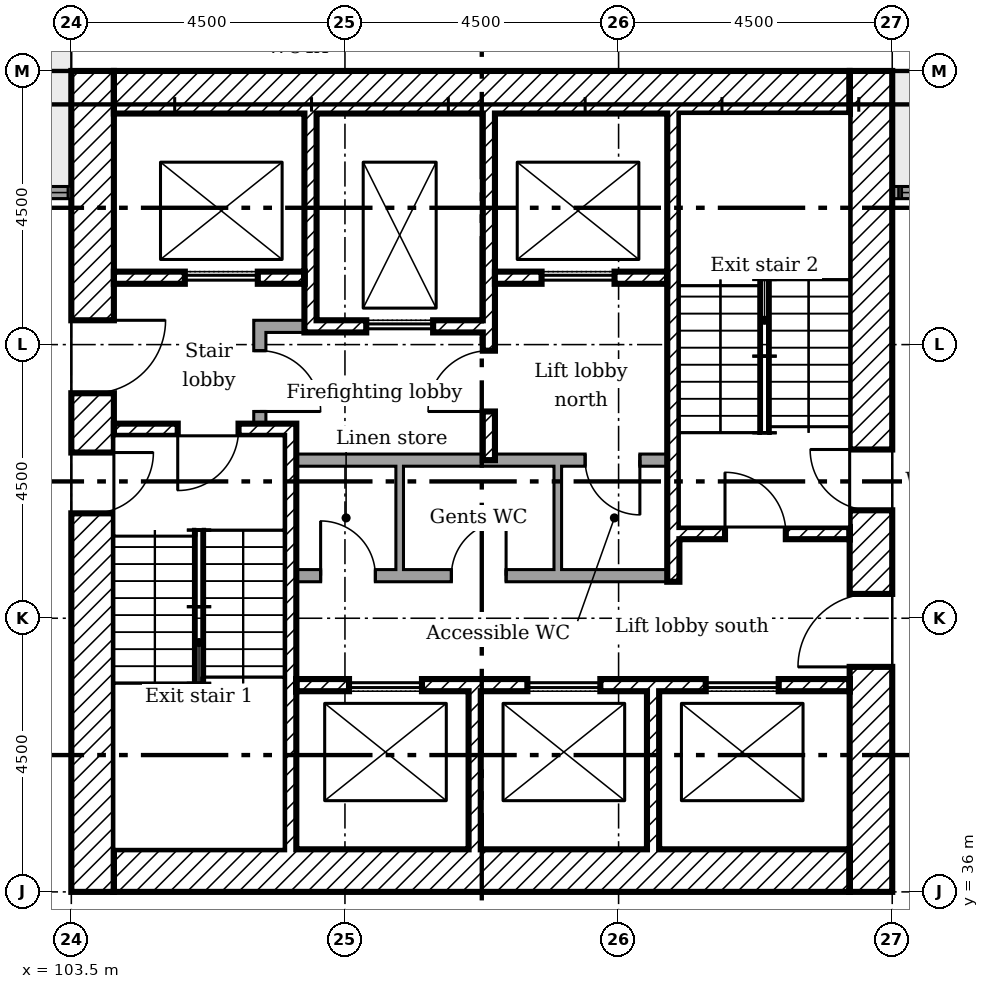
"""IFC4 building model, lengths in metres.
Left out: names, types, materials, properties, quantities, classifications, styles, units other than length and angle.
Written with IfcOpenShell. Run it as: python <this file> out.ifc"""

import sys

from ifc_helpers import new_model, si_unit, direction, frame, frame_2d, origin, place, context, subcontext, project, spatial, rectangle, extrude, element, fill, save


model = new_model("IFC4")
c1 = context("Model", 3, precision=1e-05, world=origin(), true_north=direction((0.0, 1.0)))
c2 = subcontext(c1, "Body", "Model", "MODEL_VIEW")
j1 = project(units=[si_unit("LENGTHUNIT", "METRE"), si_unit("PLANEANGLEUNIT", "RADIAN")], contexts=[c1])
p1 = place(None, origin())
s1 = spatial("IfcSite", under=j1, at=p1, CompositionType="ELEMENT")
p2 = place(p1, origin())
s2 = spatial("IfcBuilding", under=s1, at=p2, CompositionType="ELEMENT")
p3 = place(p2, frame((0.0, 0.0, 138.8)))
s3 = spatial("IfcBuildingStorey", under=s2, at=p3, CompositionType="ELEMENT", Elevation=138.8)
p4 = place(p3, frame((123.9, 47.5, 0.0), z_axis=(0.0, 0.0, 1.0), x_axis=(-1.0, 0.0, 0.0)))
e1 = element("IfcWall", 1, at=p4, inside=s3, PredefinedType="ELEMENTEDWALL", context=c2, shape_type="SweptSolid", body=[
    extrude(rectangle(XDim=6.9, YDim=0.2, at=frame_2d((3.45, 0.0))), origin(), (0.0, 0.0, 1.0), 1.8),
])
p5 = place(p3, frame((103.5, 47.5, 0.0), z_axis=(0.0, 0.0, 1.0), x_axis=(-1.0, 0.0, 0.0)))
e2 = element("IfcWall", 2, at=p5, inside=s3, PredefinedType="ELEMENTEDWALL", context=c2, shape_type="SweptSolid", body=[
    extrude(rectangle(XDim=2.1, YDim=0.2, at=frame_2d((1.05, 0.0))), origin(), (0.0, 0.0, 1.0), 1.8),
])
p6 = place(p3, frame((116.65, 36.0, 0.0), z_axis=(0.0, 0.0, 1.0), x_axis=(0.0, 1.0, 0.0)))
e3 = element("IfcWall", 3, at=p6, inside=s3, PredefinedType="SHEAR", context=c2, shape_type="SweptSolid", body=[
    extrude(rectangle(XDim=13.5, YDim=0.7, at=frame_2d((6.75, 0.0))), origin(), (0.0, 0.0, 1.0), 4.75),
])
p7 = place(p6, frame((3.7, 0.0, 0.0)))
e4 = element("IfcOpeningElement", 4, at=p7, cuts=e3, PredefinedType="OPENING", context=c2, shape_type="SweptSolid", body=[
    extrude(rectangle(XDim=1.2, YDim=2.1, at=frame_2d((0.6, 1.05))), frame((0.0, 0.36, 0.0), z_axis=(0.0, -1.0, 0.0), x_axis=(1.0, 0.0, 0.0)), (0.0, 0.0, 1.0), 0.72),
])
p8 = place(p6, frame((6.275, 0.0, 0.0)))
e5 = element("IfcOpeningElement", 5, at=p8, cuts=e3, PredefinedType="OPENING", context=c2, shape_type="SweptSolid", body=[
    extrude(rectangle(XDim=1.0, YDim=2.1, at=frame_2d((0.5, 1.05))), frame((0.0, 0.36, 0.0), z_axis=(0.0, -1.0, 0.0), x_axis=(1.0, 0.0, 0.0)), (0.0, 0.0, 1.0), 0.72),
])
for number, where in (
    (6, (104.2, 49.15, 0.0)),
    (7, (104.2, 36.35, 0.0)),
):
    element("IfcWall", number, at=place(p3, frame(where)), inside=s3, PredefinedType="SHEAR", context=c2, shape_type="SweptSolid", body=[
        extrude(rectangle(XDim=12.1, YDim=0.7, at=frame_2d((6.05, 0.0))), origin(), (0.0, 0.0, 1.0), 4.75),
    ])
p9 = place(p3, frame((103.85, 36.0, 0.0), z_axis=(0.0, 0.0, 1.0), x_axis=(0.0, 1.0, 0.0)))
e8 = element("IfcWall", 8, at=p9, inside=s3, PredefinedType="SHEAR", context=c2, shape_type="SweptSolid", body=[
    extrude(rectangle(XDim=13.5, YDim=0.7, at=frame_2d((6.75, 0.0))), origin(), (0.0, 0.0, 1.0), 4.75),
])
p10 = place(p9, frame((8.2, 0.0, 0.0)))
e9 = element("IfcOpeningElement", 9, at=p10, cuts=e8, PredefinedType="OPENING", context=c2, shape_type="SweptSolid", body=[
    extrude(rectangle(XDim=1.2, YDim=2.1, at=frame_2d((0.6, 1.05))), frame((0.0, 0.36, 0.0), z_axis=(0.0, -1.0, 0.0), x_axis=(1.0, 0.0, 0.0)), (0.0, 0.0, 1.0), 0.72),
])
p11 = place(p9, frame((6.225, 0.0, 0.0)))
e10 = element("IfcOpeningElement", 10, at=p11, cuts=e8, PredefinedType="OPENING", context=c2, shape_type="SweptSolid", body=[
    extrude(rectangle(XDim=1.0, YDim=2.1, at=frame_2d((0.5, 1.05))), frame((0.0, 0.36, 0.0), z_axis=(0.0, -1.0, 0.0), x_axis=(1.0, 0.0, 0.0)), (0.0, 0.0, 1.0), 0.72),
])
p12 = place(p3, frame((107.433, 48.8, 0.0), z_axis=(0.0, 0.0, 1.0), x_axis=(0.0, -1.0, 0.0)))
e11 = element("IfcWall", 11, at=p12, inside=s3, PredefinedType="SHEAR", context=c2, shape_type="SweptSolid", body=[
    extrude(rectangle(XDim=3.6, YDim=0.2, at=frame_2d((1.8, 0.0))), origin(), (0.0, 0.0, 1.0), 4.75),
])
p13 = place(p3, frame((110.367, 48.8, 0.0), z_axis=(0.0, 0.0, 1.0), x_axis=(0.0, -1.0, 0.0)))
e12 = element("IfcWall", 12, at=p13, inside=s3, PredefinedType="SHEAR", context=c2, shape_type="SweptSolid", body=[
    extrude(rectangle(XDim=5.7, YDim=0.2, at=frame_2d((2.85, 0.0))), origin(), (0.0, 0.0, 1.0), 4.75),
])
p14 = place(p13, frame((3.9, 0.0, 0.0)))
e13 = element("IfcOpeningElement", 13, at=p14, cuts=e12, PredefinedType="OPENING", context=c2, shape_type="SweptSolid", body=[
    extrude(rectangle(XDim=1.0, YDim=2.1, at=frame_2d((0.5, 1.05))), frame((0.0, 0.11, 0.0), z_axis=(0.0, -1.0, 0.0), x_axis=(1.0, 0.0, 0.0)), (0.0, 0.0, 1.0), 0.22),
])
for number, where, z_axis, x_axis in (
    (14, (110.133, 36.7, 0.0), (0.0, 0.0, 1.0), (0.0, 1.0, 0.0)),
    (15, (113.067, 36.7, 0.0), (0.0, 0.0, 1.0), (0.0, 1.0, 0.0)),
):
    element("IfcWall", number, at=place(p3, frame(where, z_axis=z_axis, x_axis=x_axis)), inside=s3, PredefinedType="SHEAR", context=c2, shape_type="SweptSolid", body=[
        extrude(rectangle(XDim=2.6, YDim=0.2, at=frame_2d((1.3, 0.0))), origin(), (0.0, 0.0, 1.0), 4.75),
    ])
p15 = place(p3, frame((106.5, 45.3, 0.0)))
e16 = element("IfcWall", 16, at=p15, inside=s3, PredefinedType="PARTITIONING", context=c2, shape_type="SweptSolid", body=[
    extrude(rectangle(XDim=0.833, YDim=0.2, at=frame_2d((0.417, 0.0))), origin(), (0.0, 0.0, 1.0), 4.75),
])
p16 = place(p3, frame((106.6, 43.7, 0.0), z_axis=(0.0, 0.0, 1.0), x_axis=(0.0, 1.0, 0.0)))
e17 = element("IfcWall", 17, at=p16, inside=s3, PredefinedType="PARTITIONING", context=c2, shape_type="SweptSolid", body=[
    extrude(rectangle(XDim=1.5, YDim=0.2, at=frame_2d((0.75, 0.0))), origin(), (0.0, 0.0, 1.0), 4.75),
])
p17 = place(p16, frame((0.2, 0.0, 0.0)))
e18 = element("IfcOpeningElement", 18, at=p17, cuts=e17, PredefinedType="OPENING", context=c2, shape_type="SweptSolid", body=[
    extrude(rectangle(XDim=1.0, YDim=2.1, at=frame_2d((0.5, 1.05))), frame((0.0, 0.11, 0.0), z_axis=(0.0, -1.0, 0.0), x_axis=(1.0, 0.0, 0.0)), (0.0, 0.0, 1.0), 0.22),
])
p18 = place(p3, frame((104.2, 46.1, 0.0)))
e19 = element("IfcWall", 19, at=p18, inside=s3, PredefinedType="SHEAR", context=c2, shape_type="SweptSolid", body=[
    extrude(rectangle(XDim=3.133, YDim=0.2, at=frame_2d((1.567, 0.0))), origin(), (0.0, 0.0, 1.0), 4.75),
])
p19 = place(p18, frame((1.167, 0.0, 0.0)))
e20 = element("IfcOpeningElement", 20, at=p19, cuts=e19, PredefinedType="OPENING", context=c2, shape_type="SweptSolid", body=[
    extrude(rectangle(XDim=1.2, YDim=2.1, at=frame_2d((0.6, 1.05))), frame((0.0, 0.11, 0.0), z_axis=(0.0, -1.0, 0.0), x_axis=(1.0, 0.0, 0.0)), (0.0, 0.0, 1.0), 0.22),
])
p20 = place(p3, frame((110.467, 46.1, 0.0)))
e21 = element("IfcWall", 21, at=p20, inside=s3, PredefinedType="SHEAR", context=c2, shape_type="SweptSolid", body=[
    extrude(rectangle(XDim=2.833, YDim=0.2, at=frame_2d((1.417, 0.0))), origin(), (0.0, 0.0, 1.0), 4.75),
])
p21 = place(p20, frame((0.767, 0.0, 0.0)))
e22 = element("IfcOpeningElement", 22, at=p21, cuts=e21, PredefinedType="OPENING", context=c2, shape_type="SweptSolid", body=[
    extrude(rectangle(XDim=1.2, YDim=2.1, at=frame_2d((0.6, 1.05))), frame((0.0, 0.11, 0.0), z_axis=(0.0, -1.0, 0.0), x_axis=(1.0, 0.0, 0.0)), (0.0, 0.0, 1.0), 0.22),
])
p22 = place(p3, frame((107.533, 45.3, 0.0)))
e23 = element("IfcWall", 23, at=p22, inside=s3, PredefinedType="SHEAR", context=c2, shape_type="SweptSolid", body=[
    extrude(rectangle(XDim=2.733, YDim=0.2, at=frame_2d((1.367, 0.0))), origin(), (0.0, 0.0, 1.0), 4.75),
])
p23 = place(p22, frame((0.817, 0.0, 0.0)))
e24 = element("IfcOpeningElement", 24, at=p23, cuts=e23, PredefinedType="OPENING", context=c2, shape_type="SweptSolid", body=[
    extrude(rectangle(XDim=1.1, YDim=2.1, at=frame_2d((0.55, 1.05))), frame((0.0, 0.11, 0.0), z_axis=(0.0, -1.0, 0.0), x_axis=(1.0, 0.0, 0.0)), (0.0, 0.0, 1.0), 0.22),
])
p24 = place(p3, frame((107.2, 39.4, 0.0)))
e25 = element("IfcWall", 25, at=p24, inside=s3, PredefinedType="SHEAR", context=c2, shape_type="SweptSolid", body=[
    extrude(rectangle(XDim=9.1, YDim=0.2, at=frame_2d((4.55, 0.0))), origin(), (0.0, 0.0, 1.0), 4.75),
])
p25 = place(p24, frame((0.867, 0.0, 0.0)))
e26 = element("IfcOpeningElement", 26, at=p25, cuts=e25, PredefinedType="OPENING", context=c2, shape_type="SweptSolid", body=[
    extrude(rectangle(XDim=1.2, YDim=2.1, at=frame_2d((0.6, 1.05))), frame((0.0, 0.11, 0.0), z_axis=(0.0, -1.0, 0.0), x_axis=(1.0, 0.0, 0.0)), (0.0, 0.0, 1.0), 0.22),
])
p26 = place(p24, frame((3.8, 0.0, 0.0)))
e27 = element("IfcOpeningElement", 27, at=p26, cuts=e25, PredefinedType="OPENING", context=c2, shape_type="SweptSolid", body=[
    extrude(rectangle(XDim=1.2, YDim=2.1, at=frame_2d((0.6, 1.05))), frame((0.0, 0.11, 0.0), z_axis=(0.0, -1.0, 0.0), x_axis=(1.0, 0.0, 0.0)), (0.0, 0.0, 1.0), 0.22),
])
p27 = place(p24, frame((6.733, 0.0, 0.0)))
e28 = element("IfcOpeningElement", 28, at=p27, cuts=e25, PredefinedType="OPENING", context=c2, shape_type="SweptSolid", body=[
    extrude(rectangle(XDim=1.2, YDim=2.1, at=frame_2d((0.6, 1.05))), frame((0.0, 0.11, 0.0), z_axis=(0.0, -1.0, 0.0), x_axis=(1.0, 0.0, 0.0)), (0.0, 0.0, 1.0), 0.22),
])
p28 = place(p3, frame((107.1, 36.7, 0.0), z_axis=(0.0, 0.0, 1.0), x_axis=(0.0, 1.0, 0.0)))
e29 = element("IfcWall", 29, at=p28, inside=s3, PredefinedType="SHEAR", context=c2, shape_type="SweptSolid", body=[
    extrude(rectangle(XDim=7.0, YDim=0.2, at=frame_2d((3.5, 0.0))), origin(), (0.0, 0.0, 1.0), 4.75),
])
p29 = place(p3, frame((104.2, 43.6, 0.0)))
e30 = element("IfcWall", 30, at=p29, inside=s3, PredefinedType="SHEAR", context=c2, shape_type="SweptSolid", body=[
    extrude(rectangle(XDim=2.8, YDim=0.2, at=frame_2d((1.4, 0.0))), origin(), (0.0, 0.0, 1.0), 4.75),
])
p30 = place(p29, frame((1.05, 0.0, 0.0)))
e31 = element("IfcOpeningElement", 31, at=p30, cuts=e30, PredefinedType="OPENING", context=c2, shape_type="SweptSolid", body=[
    extrude(rectangle(XDim=1.0, YDim=2.1, at=frame_2d((0.5, 1.05))), frame((0.0, 0.11, 0.0), z_axis=(0.0, -1.0, 0.0), x_axis=(1.0, 0.0, 0.0)), (0.0, 0.0, 1.0), 0.22),
])
p31 = place(p3, frame((113.5, 41.9, 0.0)))
e32 = element("IfcWall", 32, at=p31, inside=s3, PredefinedType="SHEAR", context=c2, shape_type="SweptSolid", body=[
    extrude(rectangle(XDim=2.8, YDim=0.2, at=frame_2d((1.4, 0.0))), origin(), (0.0, 0.0, 1.0), 4.75),
])
p32 = place(p31, frame((0.75, 0.0, 0.0)))
e33 = element("IfcOpeningElement", 33, at=p32, cuts=e32, PredefinedType="OPENING", context=c2, shape_type="SweptSolid", body=[
    extrude(rectangle(XDim=1.0, YDim=2.1, at=frame_2d((0.5, 1.05))), frame((0.0, 0.11, 0.0), z_axis=(0.0, -1.0, 0.0), x_axis=(1.0, 0.0, 0.0)), (0.0, 0.0, 1.0), 0.22),
])
p33 = place(p3, frame((113.4, 41.1, 0.0), z_axis=(0.0, 0.0, 1.0), x_axis=(0.0, 1.0, 0.0)))
e34 = element("IfcWall", 34, at=p33, inside=s3, PredefinedType="SHEAR", context=c2, shape_type="SweptSolid", body=[
    extrude(rectangle(XDim=7.7, YDim=0.2, at=frame_2d((3.85, 0.0))), origin(), (0.0, 0.0, 1.0), 4.75),
])
p34 = place(p3, frame((107.2, 43.1, 0.0)))
e35 = element("IfcWall", 35, at=p34, inside=s3, PredefinedType="PARTITIONING", context=c2, shape_type="SweptSolid", body=[
    extrude(rectangle(XDim=6.1, YDim=0.2, at=frame_2d((3.05, 0.0))), origin(), (0.0, 0.0, 1.0), 4.75),
])
p35 = place(p34, frame((4.75, 0.0, 0.0)))
e36 = element("IfcOpeningElement", 36, at=p35, cuts=e35, PredefinedType="OPENING", context=c2, shape_type="SweptSolid", body=[
    extrude(rectangle(XDim=0.9, YDim=2.1, at=frame_2d((0.45, 1.05))), frame((0.0, 0.11, 0.0), z_axis=(0.0, -1.0, 0.0), x_axis=(1.0, 0.0, 0.0)), (0.0, 0.0, 1.0), 0.22),
])
p36 = place(p3, frame((107.2, 41.2, 0.0)))
e37 = element("IfcWall", 37, at=p36, inside=s3, PredefinedType="PARTITIONING", context=c2, shape_type="SweptSolid", body=[
    extrude(rectangle(XDim=6.1, YDim=0.2, at=frame_2d((3.05, 0.0))), origin(), (0.0, 0.0, 1.0), 4.75),
])
p37 = place(p36, frame((0.4, 0.0, 0.0)))
e38 = element("IfcOpeningElement", 38, at=p37, cuts=e37, PredefinedType="OPENING", context=c2, shape_type="SweptSolid", body=[
    extrude(rectangle(XDim=0.9, YDim=2.1, at=frame_2d((0.45, 1.05))), frame((0.0, 0.11, 0.0), z_axis=(0.0, -1.0, 0.0), x_axis=(1.0, 0.0, 0.0)), (0.0, 0.0, 1.0), 0.22),
])
p38 = place(p36, frame((2.55, 0.0, 0.0)))
e39 = element("IfcOpeningElement", 39, at=p38, cuts=e37, PredefinedType="OPENING", context=c2, shape_type="SweptSolid", body=[
    extrude(rectangle(XDim=0.9, YDim=2.1, at=frame_2d((0.45, 1.05))), frame((0.0, 0.11, 0.0), z_axis=(0.0, -1.0, 0.0), x_axis=(1.0, 0.0, 0.0)), (0.0, 0.0, 1.0), 0.22),
])
for number, where, z_axis, x_axis in (
    (40, (108.9, 41.3, 0.0), (0.0, 0.0, 1.0), (0.0, 1.0, 0.0)),
    (41, (111.5, 41.3, 0.0), (0.0, 0.0, 1.0), (0.0, 1.0, 0.0)),
):
    element("IfcWall", number, at=place(p3, frame(where, z_axis=z_axis, x_axis=x_axis)), inside=s3, PredefinedType="PARTITIONING", context=c2, shape_type="SweptSolid", body=[
        extrude(rectangle(XDim=1.7, YDim=0.125, at=frame_2d((0.85, 0.0))), origin(), (0.0, 0.0, 1.0), 4.75),
    ])
p39 = place(p10, frame((1.2, 0.0, 0.0), x_axis=(-1.0, 0.0, 0.0)))
e42 = element("IfcDoor", 42, at=p39, inside=s3, OperationType="SINGLE_SWING_RIGHT", PredefinedType="DOOR", context=c2, shape_type="SweptSolid", body=[
    extrude(rectangle(XDim=1.2, YDim=2.1, at=frame_2d((0.6, 1.05))), frame((0.0, 0.025, 0.0), z_axis=(0.0, -1.0, 0.0), x_axis=(1.0, 0.0, 0.0)), (0.0, 0.0, 1.0), 0.05),
])
fill(e9, e42)
p40 = place(p7, origin())
e43 = element("IfcDoor", 43, at=p40, inside=s3, OperationType="SINGLE_SWING_RIGHT", PredefinedType="DOOR", context=c2, shape_type="SweptSolid", body=[
    extrude(rectangle(XDim=1.2, YDim=2.1, at=frame_2d((0.6, 1.05))), frame((0.0, 0.025, 0.0), z_axis=(0.0, -1.0, 0.0), x_axis=(1.0, 0.0, 0.0)), (0.0, 0.0, 1.0), 0.05),
])
fill(e4, e43)
p41 = place(p30, frame((1.0, 0.0, 0.0), x_axis=(-1.0, 0.0, 0.0)))
e44 = element("IfcDoor", 44, at=p41, inside=s3, OperationType="SINGLE_SWING_LEFT", PredefinedType="DOOR", context=c2, shape_type="SweptSolid", body=[
    extrude(rectangle(XDim=1.0, YDim=2.1, at=frame_2d((0.5, 1.05))), frame((0.0, 0.025, 0.0), z_axis=(0.0, -1.0, 0.0), x_axis=(1.0, 0.0, 0.0)), (0.0, 0.0, 1.0), 0.05),
])
fill(e31, e44)
p42 = place(p11, frame((1.0, 0.0, 0.0), x_axis=(-1.0, 0.0, 0.0)))
e45 = element("IfcDoor", 45, at=p42, inside=s3, OperationType="SINGLE_SWING_RIGHT", PredefinedType="DOOR", context=c2, shape_type="SweptSolid", body=[
    extrude(rectangle(XDim=1.0, YDim=2.1, at=frame_2d((0.5, 1.05))), frame((0.0, 0.025, 0.0), z_axis=(0.0, -1.0, 0.0), x_axis=(1.0, 0.0, 0.0)), (0.0, 0.0, 1.0), 0.05),
])
fill(e10, e45)
p43 = place(p32, origin())
e46 = element("IfcDoor", 46, at=p43, inside=s3, OperationType="SINGLE_SWING_RIGHT", PredefinedType="DOOR", context=c2, shape_type="SweptSolid", body=[
    extrude(rectangle(XDim=1.0, YDim=2.1, at=frame_2d((0.5, 1.05))), frame((0.0, 0.025, 0.0), z_axis=(0.0, -1.0, 0.0), x_axis=(1.0, 0.0, 0.0)), (0.0, 0.0, 1.0), 0.05),
])
fill(e33, e46)
p44 = place(p8, origin())
e47 = element("IfcDoor", 47, at=p44, inside=s3, OperationType="SINGLE_SWING_LEFT", PredefinedType="DOOR", context=c2, shape_type="SweptSolid", body=[
    extrude(rectangle(XDim=1.0, YDim=2.1, at=frame_2d((0.5, 1.05))), frame((0.0, 0.025, 0.0), z_axis=(0.0, -1.0, 0.0), x_axis=(1.0, 0.0, 0.0)), (0.0, 0.0, 1.0), 0.05),
])
fill(e5, e47)
p45 = place(p14, frame((1.0, 0.0, 0.0), x_axis=(-1.0, 0.0, 0.0)))
e48 = element("IfcDoor", 48, at=p45, inside=s3, OperationType="SINGLE_SWING_RIGHT", PredefinedType="DOOR", context=c2, shape_type="SweptSolid", body=[
    extrude(rectangle(XDim=1.0, YDim=2.1, at=frame_2d((0.5, 1.05))), frame((0.0, 0.025, 0.0), z_axis=(0.0, -1.0, 0.0), x_axis=(1.0, 0.0, 0.0)), (0.0, 0.0, 1.0), 0.05),
])
fill(e13, e48)
p46 = place(p17, frame((1.0, 0.0, 0.0), x_axis=(-1.0, 0.0, 0.0)))
e49 = element("IfcDoor", 49, at=p46, inside=s3, OperationType="SINGLE_SWING_LEFT", PredefinedType="DOOR", context=c2, shape_type="SweptSolid", body=[
    extrude(rectangle(XDim=1.0, YDim=2.1, at=frame_2d((0.5, 1.05))), frame((0.0, 0.025, 0.0), z_axis=(0.0, -1.0, 0.0), x_axis=(1.0, 0.0, 0.0)), (0.0, 0.0, 1.0), 0.05),
])
fill(e18, e49)
p47 = place(p37, origin())
e50 = element("IfcDoor", 50, at=p47, inside=s3, OperationType="SINGLE_SWING_RIGHT", PredefinedType="DOOR", context=c2, shape_type="SweptSolid", body=[
    extrude(rectangle(XDim=0.9, YDim=2.1, at=frame_2d((0.45, 1.05))), frame((0.0, 0.025, 0.0), z_axis=(0.0, -1.0, 0.0), x_axis=(1.0, 0.0, 0.0)), (0.0, 0.0, 1.0), 0.05),
])
fill(e38, e50)
p48 = place(p38, origin())
e51 = element("IfcDoor", 51, at=p48, inside=s3, OperationType="SINGLE_SWING_LEFT", PredefinedType="DOOR", context=c2, shape_type="SweptSolid", body=[
    extrude(rectangle(XDim=0.9, YDim=2.1, at=frame_2d((0.45, 1.05))), frame((0.0, 0.025, 0.0), z_axis=(0.0, -1.0, 0.0), x_axis=(1.0, 0.0, 0.0)), (0.0, 0.0, 1.0), 0.05),
])
fill(e39, e51)
p49 = place(p35, frame((0.9, 0.0, 0.0), x_axis=(-1.0, 0.0, 0.0)))
e52 = element("IfcDoor", 52, at=p49, inside=s3, OperationType="SINGLE_SWING_RIGHT", PredefinedType="DOOR", context=c2, shape_type="SweptSolid", body=[
    extrude(rectangle(XDim=0.9, YDim=2.1, at=frame_2d((0.45, 1.05))), frame((0.0, 0.025, 0.0), z_axis=(0.0, -1.0, 0.0), x_axis=(1.0, 0.0, 0.0)), (0.0, 0.0, 1.0), 0.05),
])
fill(e36, e52)
p50 = place(p23, origin())
e53 = element("IfcDoor", 53, at=p50, inside=s3, OperationType="SLIDING_TO_LEFT", PredefinedType="DOOR", context=c2, shape_type="SweptSolid", body=[
    extrude(rectangle(XDim=1.1, YDim=2.1, at=frame_2d((0.55, 1.05))), frame((0.0, 0.025, 0.0), z_axis=(0.0, -1.0, 0.0), x_axis=(1.0, 0.0, 0.0)), (0.0, 0.0, 1.0), 0.05),
])
fill(e24, e53)
p51 = place(p25, origin())
e54 = element("IfcDoor", 54, at=p51, inside=s3, OperationType="SLIDING_TO_LEFT", PredefinedType="DOOR", context=c2, shape_type="SweptSolid", body=[
    extrude(rectangle(XDim=1.2, YDim=2.1, at=frame_2d((0.6, 1.05))), frame((0.0, 0.025, 0.0), z_axis=(0.0, -1.0, 0.0), x_axis=(1.0, 0.0, 0.0)), (0.0, 0.0, 1.0), 0.05),
])
fill(e26, e54)
p52 = place(p26, origin())
e55 = element("IfcDoor", 55, at=p52, inside=s3, OperationType="SLIDING_TO_LEFT", PredefinedType="DOOR", context=c2, shape_type="SweptSolid", body=[
    extrude(rectangle(XDim=1.2, YDim=2.1, at=frame_2d((0.6, 1.05))), frame((0.0, 0.025, 0.0), z_axis=(0.0, -1.0, 0.0), x_axis=(1.0, 0.0, 0.0)), (0.0, 0.0, 1.0), 0.05),
])
fill(e27, e55)
p53 = place(p27, origin())
e56 = element("IfcDoor", 56, at=p53, inside=s3, OperationType="SLIDING_TO_LEFT", PredefinedType="DOOR", context=c2, shape_type="SweptSolid", body=[
    extrude(rectangle(XDim=1.2, YDim=2.1, at=frame_2d((0.6, 1.05))), frame((0.0, 0.025, 0.0), z_axis=(0.0, -1.0, 0.0), x_axis=(1.0, 0.0, 0.0)), (0.0, 0.0, 1.0), 0.05),
])
fill(e28, e56)
p54 = place(p19, origin())
e57 = element("IfcDoor", 57, at=p54, inside=s3, OperationType="SLIDING_TO_LEFT", PredefinedType="DOOR", context=c2, shape_type="SweptSolid", body=[
    extrude(rectangle(XDim=1.2, YDim=2.1, at=frame_2d((0.6, 1.05))), frame((0.0, 0.025, 0.0), z_axis=(0.0, -1.0, 0.0), x_axis=(1.0, 0.0, 0.0)), (0.0, 0.0, 1.0), 0.05),
])
fill(e20, e57)
p55 = place(p21, origin())
e58 = element("IfcDoor", 58, at=p55, inside=s3, OperationType="SLIDING_TO_LEFT", PredefinedType="DOOR", context=c2, shape_type="SweptSolid", body=[
    extrude(rectangle(XDim=1.2, YDim=2.1, at=frame_2d((0.6, 1.05))), frame((0.0, 0.025, 0.0), z_axis=(0.0, -1.0, 0.0), x_axis=(1.0, 0.0, 0.0)), (0.0, 0.0, 1.0), 0.05),
])
fill(e22, e58)
save(model, sys.argv[1])
